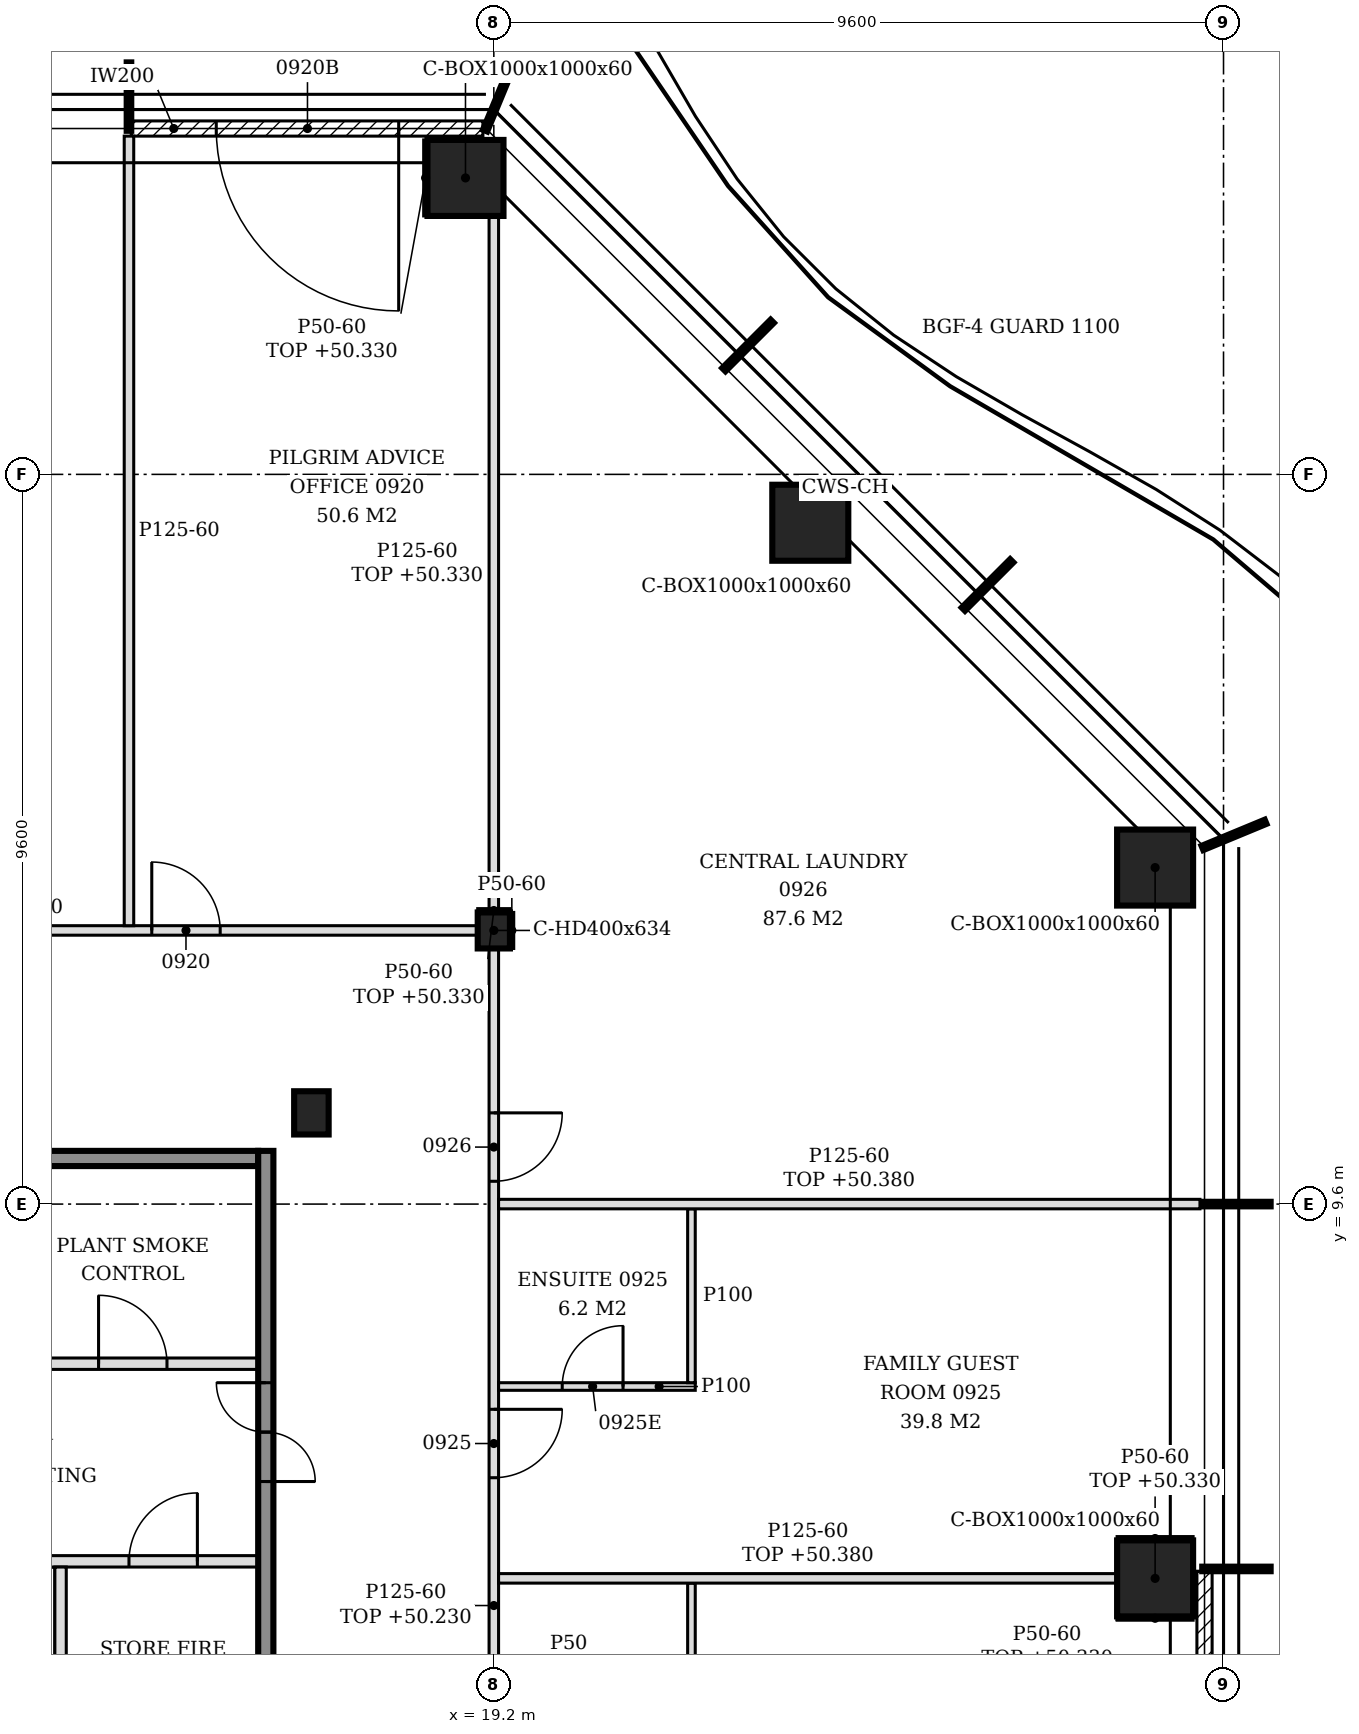
"""IFC4 building model, lengths in metres.
Left out: names, types, materials, properties, quantities, classifications, styles, units other than length and angle.
Written with IfcOpenShell. Run it as: python <this file> out.ifc"""

import sys

from ifc_helpers import new_model, si_unit, direction, frame, frame_2d, origin, origin_2d, place, context, subcontext, project, spatial, polyline, rectangle, hollow_rectangle, i_section, outline, extrude, element, fill, save


model = new_model("IFC4")
c1 = context("Model", 3, precision=1e-05, world=origin(), true_north=direction((0.0, 1.0)))
c2 = subcontext(c1, "Body", "Model", "MODEL_VIEW")
j1 = project(units=[si_unit("LENGTHUNIT", "METRE"), si_unit("PLANEANGLEUNIT", "RADIAN")], contexts=[c1])
p1 = place(None, origin())
s1 = spatial("IfcSite", under=j1, at=p1, CompositionType="ELEMENT")
p2 = place(p1, origin())
s2 = spatial("IfcBuilding", under=s1, at=p2, CompositionType="ELEMENT")
p3 = place(p2, frame((0.0, 0.0, 47.4)))
s3 = spatial("IfcBuildingStorey", under=s2, at=p3, CompositionType="ELEMENT", Elevation=47.4)
for number, where, z_axis, x_axis in (
    (1, (27.9, 4.676, -0.15), (0.0, 0.0, 1.0), (1.0, 0.0, 0.0)),
    (2, (27.9, 14.027, -0.15), (0.0, 0.0, 1.0), (1.0, 0.0, 0.0)),
    (3, (23.364, 18.564, -0.15), (0.0, 0.0, 1.0), (1.0, 0.0, 0.0)),
    (4, (18.827, 23.1, -0.15), (0.0, 0.0, 1.0), (1.0, 0.0, 0.0)),
):
    element("IfcColumn", number, at=place(p3, frame(where, z_axis=z_axis, x_axis=x_axis)), inside=s3, PredefinedType="COLUMN", context=c2, shape_type="SweptSolid", body=[
        extrude(hollow_rectangle(XDim=1.0, YDim=1.0, WallThickness=0.06, at=origin_2d()), origin(), (0.0, 0.0, 1.0), 3.6),
    ])
p4 = place(p3, frame((19.2, 13.2, -0.15), z_axis=(0.0, 0.0, 1.0), x_axis=(1.0, 0.0, 0.0)))
e5 = element("IfcColumn", 5, at=p4, inside=s3, PredefinedType="COLUMN", context=c2, shape_type="SweptSolid", body=[
    extrude(i_section(OverallWidth=0.424, OverallDepth=0.474, WebThickness=0.048, FlangeThickness=0.077, FilletRadius=0.015, at=origin_2d()), origin(), (0.0, 0.0, 1.0), 3.6),
])
p5 = place(p3, frame((16.8, 10.8, -0.15), z_axis=(0.0, 0.0, 1.0), x_axis=(1.0, 0.0, 0.0)))
e6 = element("IfcColumn", 6, at=p5, inside=s3, PredefinedType="COLUMN", context=c2, shape_type="SweptSolid", body=[
    extrude(i_section(OverallWidth=0.454, OverallDepth=0.569, WebThickness=0.078, FlangeThickness=0.125, FilletRadius=0.015, at=origin_2d()), origin(), (0.0, 0.0, 1.0), 3.6),
])
p6 = place(p3, frame((28.55, 0.03, 0.0), z_axis=(0.0, 0.0, 1.0), x_axis=(0.0, 1.0, 0.0)))
e7 = element("IfcWall", 7, at=p6, inside=s3, PredefinedType="NOTDEFINED", context=c2, shape_type="SweptSolid", body=[
    extrude(rectangle(XDim=4.74, YDim=0.2, at=frame_2d((2.37, 0.0))), origin(), (0.0, 0.0, 1.0), 3.45),
])
p7 = place(p6, frame((1.17, 0.0, 0.0)))
e8 = element("IfcOpeningElement", 8, at=p7, cuts=e7, PredefinedType="OPENING", context=c2, shape_type="SweptSolid", body=[
    extrude(rectangle(XDim=2.4, YDim=2.4, at=frame_2d((1.2, 1.2))), frame((0.0, 0.11, 0.0), z_axis=(0.0, -1.0, 0.0), x_axis=(1.0, 0.0, 0.0)), (0.0, 0.0, 1.0), 0.22),
])
p8 = place(p3, frame((19.056, 23.75, 0.0), z_axis=(0.0, 0.0, 1.0), x_axis=(-1.0, 0.0, 0.0)))
e9 = element("IfcWall", 9, at=p8, inside=s3, PredefinedType="NOTDEFINED", context=c2, shape_type="SweptSolid", body=[
    extrude(rectangle(XDim=4.626, YDim=0.2, at=frame_2d((2.313, 0.0))), origin(), (0.0, 0.0, 1.0), 3.45),
])
p9 = place(p8, frame((1.108, 0.0, 0.0)))
e10 = element("IfcOpeningElement", 10, at=p9, cuts=e9, PredefinedType="OPENING", context=c2, shape_type="SweptSolid", body=[
    extrude(rectangle(XDim=2.4, YDim=2.4, at=frame_2d((1.2, 1.2))), frame((0.0, 0.11, 0.0), z_axis=(0.0, -1.0, 0.0), x_axis=(1.0, 0.0, 0.0)), (0.0, 0.0, 1.0), 0.22),
])
p10 = place(p3, frame((9.7, 4.9, 0.0), z_axis=(0.0, 0.0, 1.0), x_axis=(1.0, 0.0, 0.0)))
e11 = element("IfcWall", 11, at=p10, inside=s3, PredefinedType="SOLIDWALL", context=c2, shape_type="SweptSolid", body=[
    extrude(rectangle(XDim=6.4, YDim=0.15, at=frame_2d((3.2, 0.0))), origin(), (0.0, 0.0, 1.0), 3.45),
])
p11 = place(p10, frame((0.45, 0.0, 0.0)))
e12 = element("IfcOpeningElement", 12, at=p11, cuts=e11, PredefinedType="OPENING", context=c2, shape_type="SweptSolid", body=[
    extrude(rectangle(XDim=1.0, YDim=2.1, at=frame_2d((0.5, 1.05))), frame((0.0, 0.085, 0.0), z_axis=(0.0, -1.0, 0.0), x_axis=(1.0, 0.0, 0.0)), (0.0, 0.0, 1.0), 0.17),
])
p12 = place(p10, frame((2.35, 0.0, 0.0)))
e13 = element("IfcOpeningElement", 13, at=p12, cuts=e11, PredefinedType="OPENING", context=c2, shape_type="SweptSolid", body=[
    extrude(rectangle(XDim=1.0, YDim=2.1, at=frame_2d((0.5, 1.05))), frame((0.0, 0.085, 0.0), z_axis=(0.0, -1.0, 0.0), x_axis=(1.0, 0.0, 0.0)), (0.0, 0.0, 1.0), 0.17),
])
p13 = place(p10, frame((4.7, 0.0, 0.0)))
e14 = element("IfcOpeningElement", 14, at=p13, cuts=e11, PredefinedType="OPENING", context=c2, shape_type="SweptSolid", body=[
    extrude(rectangle(XDim=0.9, YDim=2.1, at=frame_2d((0.45, 1.05))), frame((0.0, 0.085, 0.0), z_axis=(0.0, -1.0, 0.0), x_axis=(1.0, 0.0, 0.0)), (0.0, 0.0, 1.0), 0.17),
])
p14 = place(p3, frame((12.7, 7.5, 0.0), z_axis=(0.0, 0.0, 1.0), x_axis=(1.0, 0.0, 0.0)))
e15 = element("IfcWall", 15, at=p14, inside=s3, PredefinedType="SOLIDWALL", context=c2, shape_type="SweptSolid", body=[
    extrude(rectangle(XDim=3.4, YDim=0.15, at=frame_2d((1.7, 0.0))), origin(), (0.0, 0.0, 1.0), 3.45),
])
p15 = place(p14, frame((1.3, 0.0, 0.0)))
e16 = element("IfcOpeningElement", 16, at=p15, cuts=e15, PredefinedType="OPENING", context=c2, shape_type="SweptSolid", body=[
    extrude(rectangle(XDim=0.9, YDim=2.1, at=frame_2d((0.45, 1.05))), frame((0.0, 0.085, 0.0), z_axis=(0.0, -1.0, 0.0), x_axis=(1.0, 0.0, 0.0)), (0.0, 0.0, 1.0), 0.17),
])
p16 = place(p3, frame((12.7, 10.2, 0.0), z_axis=(0.0, 0.0, 1.0), x_axis=(1.0, 0.0, 0.0)))
e17 = element("IfcWall", 17, at=p16, inside=s3, PredefinedType="SOLIDWALL", context=c2, shape_type="SweptSolid", body=[
    extrude(rectangle(XDim=3.4, YDim=0.2, at=frame_2d((1.7, 0.0))), origin(), (0.0, 0.0, 1.0), 3.45),
])
p17 = place(p3, frame((13.5, 2.275, 0.0), z_axis=(0.0, 0.0, 1.0), x_axis=(0.0, 1.0, 0.0)))
e18 = element("IfcWall", 18, at=p17, inside=s3, PredefinedType="SOLIDWALL", context=c2, shape_type="SweptSolid", body=[
    extrude(rectangle(XDim=2.55, YDim=0.15, at=frame_2d((1.275, 0.0))), origin(), (0.0, 0.0, 1.0), 3.45),
])
p18 = place(p3, frame((16.2, -5.5, 0.0), z_axis=(0.0, 0.0, 1.0), x_axis=(0.0, 1.0, 0.0)))
e19 = element("IfcWall", 19, at=p18, inside=s3, PredefinedType="SOLIDWALL", context=c2, shape_type="SweptSolid", body=[
    extrude(rectangle(XDim=15.8, YDim=0.2, at=frame_2d((7.9, 0.0))), origin(), (0.0, 0.0, 1.0), 3.45),
])
p19 = place(p18, frame((3.05, 0.0, 0.0)))
e20 = element("IfcOpeningElement", 20, at=p19, cuts=e19, PredefinedType="OPENING", context=c2, shape_type="SweptSolid", body=[
    extrude(rectangle(XDim=1.3, YDim=2.1, at=frame_2d((0.65, 1.05))), frame((0.0, 0.11, 0.0), z_axis=(0.0, -1.0, 0.0), x_axis=(1.0, 0.0, 0.0)), (0.0, 0.0, 1.0), 0.22),
])
p20 = place(p18, frame((11.45, 0.0, 0.0)))
e21 = element("IfcOpeningElement", 21, at=p20, cuts=e19, PredefinedType="OPENING", context=c2, shape_type="SweptSolid", body=[
    extrude(rectangle(XDim=1.3, YDim=2.1, at=frame_2d((0.65, 1.05))), frame((0.0, 0.11, 0.0), z_axis=(0.0, -1.0, 0.0), x_axis=(1.0, 0.0, 0.0)), (0.0, 0.0, 1.0), 0.22),
])
p21 = place(p3, frame((21.8, 2.326, 0.0), z_axis=(0.0, 0.0, 1.0), x_axis=(0.0, 1.0, 0.0)))
e22 = element("IfcWall", 22, at=p21, inside=s3, PredefinedType="PARTITIONING", context=c2, shape_type="SweptSolid", body=[
    extrude(rectangle(XDim=2.288, YDim=0.1, at=frame_2d((1.144, 0.0))), origin(), (0.0, 0.0, 1.0), 3.45),
])
p22 = place(p3, frame((19.2, 2.637, 0.0), z_axis=(0.0, 0.0, 1.0), x_axis=(0.0, 1.0, 0.0)))
e23 = element("IfcWall", 23, at=p22, inside=s3, PredefinedType="PARTITIONING", context=c2, shape_type="SweptSolid", body=[
    extrude(rectangle(XDim=10.326, YDim=0.125, at=frame_2d((5.163, 0.0))), origin(), (0.0, 0.0, 1.0), 2.83),
])
p23 = place(p22, frame((3.363, 0.0, 0.0)))
e24 = element("IfcOpeningElement", 24, at=p23, cuts=e23, PredefinedType="OPENING", context=c2, shape_type="SweptSolid", body=[
    extrude(rectangle(XDim=0.9, YDim=2.1, at=frame_2d((0.45, 1.05))), frame((0.0, 0.073, 0.0), z_axis=(0.0, -1.0, 0.0), x_axis=(1.0, 0.0, 0.0)), (0.0, 0.0, 1.0), 0.145),
])
p24 = place(p22, frame((7.263, 0.0, 0.0)))
e25 = element("IfcOpeningElement", 25, at=p24, cuts=e23, PredefinedType="OPENING", context=c2, shape_type="SweptSolid", body=[
    extrude(rectangle(XDim=0.9, YDim=2.1, at=frame_2d((0.45, 1.05))), frame((0.0, 0.073, 0.0), z_axis=(0.0, -1.0, 0.0), x_axis=(1.0, 0.0, 0.0)), (0.0, 0.0, 1.0), 0.145),
])
p25 = place(p3, frame((19.262, 4.676, 0.0), z_axis=(0.0, 0.0, 1.0), x_axis=(1.0, 0.0, 0.0)))
e26 = element("IfcWall", 26, at=p25, inside=s3, PredefinedType="PARTITIONING", context=c2, shape_type="SweptSolid", body=[
    extrude(outline(polyline([(0.0, 0.0), (8.137, 0.0), (8.137, 2.98), (0.087, 2.98), (0.085, 2.83), (0.0, 2.83), (0.0, 0.0)])), frame((0.0, 0.062, 0.0), z_axis=(0.0, -1.0, 0.0), x_axis=(1.0, 0.0, 0.0)), (0.0, 0.0, 1.0), 0.125),
])
p26 = place(p3, frame((19.262, 7.2, 0.0), z_axis=(0.0, 0.0, 1.0), x_axis=(1.0, 0.0, 0.0)))
e27 = element("IfcWall", 27, at=p26, inside=s3, PredefinedType="PARTITIONING", context=c2, shape_type="SweptSolid", body=[
    extrude(outline(polyline([(0.0, 0.0), (2.588, 0.0), (2.587, 3.45), (0.087, 3.45), (0.085, 2.83), (0.0, 2.83), (0.0, 0.0)])), frame((0.0, 0.05, 0.0), z_axis=(0.0, -1.0, 0.0), x_axis=(1.0, 0.0, 0.0)), (0.0, 0.0, 1.0), 0.1),
])
p27 = place(p26, frame((0.837, 0.0, 0.0)))
e28 = element("IfcOpeningElement", 28, at=p27, cuts=e27, PredefinedType="OPENING", context=c2, shape_type="SweptSolid", body=[
    extrude(rectangle(XDim=0.8, YDim=2.1, at=frame_2d((0.4, 1.05))), frame((0.0, 0.06, 0.0), z_axis=(0.0, -1.0, 0.0), x_axis=(1.0, 0.0, 0.0)), (0.0, 0.0, 1.0), 0.12),
])
p28 = place(p3, frame((21.8, 7.25, 0.0), z_axis=(0.0, 0.0, 1.0), x_axis=(0.0, 1.0, 0.0)))
e29 = element("IfcWall", 29, at=p28, inside=s3, PredefinedType="PARTITIONING", context=c2, shape_type="SweptSolid", body=[
    extrude(outline(polyline([(0.0, 0.0), (2.288, 0.0), (2.288, 2.98), (2.255, 2.98), (2.253, 3.45), (0.0, 3.45), (0.0, 0.0)])), frame((0.0, 0.05, 0.0), z_axis=(0.0, -1.0, 0.0), x_axis=(1.0, 0.0, 0.0)), (0.0, 0.0, 1.0), 0.1),
])
p29 = place(p3, frame((19.262, 9.6, 0.0), z_axis=(0.0, 0.0, 1.0), x_axis=(1.0, 0.0, 0.0)))
e30 = element("IfcWall", 30, at=p29, inside=s3, PredefinedType="PARTITIONING", context=c2, shape_type="SweptSolid", body=[
    extrude(outline(polyline([(0.0, 0.0), (9.228, 0.0), (9.228, 2.98), (8.788, 2.98), (8.785, 2.93), (8.488, 2.93), (8.486, 2.98), (0.087, 2.98), (0.085, 2.83), (0.0, 2.83), (0.0, 0.0)])), frame((0.0, 0.062, 0.0), z_axis=(0.0, -1.0, 0.0), x_axis=(1.0, 0.0, 0.0)), (0.0, 0.0, 1.0), 0.125),
])
p30 = place(p3, frame((7.412, 13.2, 0.0), z_axis=(0.0, 0.0, 1.0), x_axis=(1.0, 0.0, 0.0)))
e31 = element("IfcWall", 31, at=p30, inside=s3, PredefinedType="PARTITIONING", context=c2, shape_type="SweptSolid", body=[
    extrude(rectangle(XDim=11.576, YDim=0.125, at=frame_2d((5.788, 0.0))), origin(), (0.0, 0.0, 1.0), 2.83),
])
p31 = place(p30, frame((0.788, 0.0, 0.0)))
e32 = element("IfcOpeningElement", 32, at=p31, cuts=e31, PredefinedType="OPENING", context=c2, shape_type="SweptSolid", body=[
    extrude(rectangle(XDim=0.9, YDim=2.1, at=frame_2d((0.45, 1.05))), frame((0.0, 0.073, 0.0), z_axis=(0.0, -1.0, 0.0), x_axis=(1.0, 0.0, 0.0)), (0.0, 0.0, 1.0), 0.145),
])
p32 = place(p30, frame((2.302, 0.0, 0.0)))
e33 = element("IfcOpeningElement", 33, at=p32, cuts=e31, PredefinedType="OPENING", context=c2, shape_type="SweptSolid", body=[
    extrude(rectangle(XDim=0.9, YDim=2.1, at=frame_2d((0.45, 1.05))), frame((0.0, 0.073, 0.0), z_axis=(0.0, -1.0, 0.0), x_axis=(1.0, 0.0, 0.0)), (0.0, 0.0, 1.0), 0.145),
])
p33 = place(p30, frame((7.288, 0.0, 0.0)))
e34 = element("IfcOpeningElement", 34, at=p33, cuts=e31, PredefinedType="OPENING", context=c2, shape_type="SweptSolid", body=[
    extrude(rectangle(XDim=0.9, YDim=2.1, at=frame_2d((0.45, 1.05))), frame((0.0, 0.073, 0.0), z_axis=(0.0, -1.0, 0.0), x_axis=(1.0, 0.0, 0.0)), (0.0, 0.0, 1.0), 0.145),
])
p34 = place(p3, frame((14.4, 13.262, 0.0), z_axis=(0.0, 0.0, 1.0), x_axis=(0.0, 1.0, 0.0)))
e35 = element("IfcWall", 35, at=p34, inside=s3, PredefinedType="PARTITIONING", context=c2, shape_type="SweptSolid", body=[
    extrude(outline(polyline([(0.0, 0.0), (10.387, 0.0), (10.387, 3.45), (9.988, 3.45), (9.986, 2.93), (9.688, 2.93), (9.686, 3.45), (6.042, 3.45), (6.041, 2.88), (5.833, 2.88), (5.831, 3.45), (0.087, 3.45), (0.085, 2.83), (0.0, 2.83), (0.0, 0.0)])), frame((0.0, 0.062, 0.0), z_axis=(0.0, -1.0, 0.0), x_axis=(1.0, 0.0, 0.0)), (0.0, 0.0, 1.0), 0.125),
])
p35 = place(p3, frame((19.2, 13.437, 0.0), z_axis=(0.0, 0.0, 1.0), x_axis=(0.0, 1.0, 0.0)))
e36 = element("IfcWall", 36, at=p35, inside=s3, PredefinedType="PARTITIONING", context=c2, shape_type="SweptSolid", body=[
    extrude(outline(polyline([(0.0, 0.0), (9.163, 0.0), (9.163, 2.63), (8.733, 2.63), (8.731, 2.93), (0.0, 2.93), (0.0, 0.0)])), frame((0.0, 0.062, 0.0), z_axis=(0.0, -1.0, 0.0), x_axis=(1.0, 0.0, 0.0)), (0.0, 0.0, 1.0), 0.125),
])
p36 = place(p3, frame((19.437, 12.963, 0.0), z_axis=(0.0, 0.0, 1.0), x_axis=(0.0, 1.0, 0.0)))
e37 = element("IfcWall", 37, at=p36, inside=s3, PredefinedType="PARTITIONING", context=c2, shape_type="SweptSolid", body=[
    extrude(rectangle(XDim=0.474, YDim=0.05, at=frame_2d((0.237, 0.0))), origin(), (0.0, 0.0, 1.0), 3.45),
])
for number, where, z_axis, x_axis in (
    (38, (27.4, 5.201, 0.0), (0.0, 0.0, 1.0), (1.0, 0.0, 0.0)),
    (39, (27.4, 4.151, 0.0), (0.0, 0.0, 1.0), (1.0, 0.0, 0.0)),
):
    element("IfcWall", number, at=place(p3, frame(where, z_axis=z_axis, x_axis=x_axis)), inside=s3, PredefinedType="PARTITIONING", context=c2, shape_type="SweptSolid", body=[
        extrude(rectangle(XDim=1.0, YDim=0.05, at=frame_2d((0.5, 0.0))), origin(), (0.0, 0.0, 1.0), 2.93),
    ])
p37 = place(p3, frame((18.988, 13.462, 0.0), z_axis=(0.0, 0.0, 1.0), x_axis=(1.0, 0.0, 0.0)))
e40 = element("IfcWall", 40, at=p37, inside=s3, PredefinedType="PARTITIONING", context=c2, shape_type="SweptSolid", body=[
    extrude(rectangle(XDim=0.424, YDim=0.05, at=frame_2d((0.212, 0.0))), origin(), (0.0, 0.0, 1.0), 2.93),
])
p38 = place(p3, frame((18.302, 22.6, 0.0), z_axis=(0.0, 0.0, 1.0), x_axis=(0.0, 1.0, 0.0)))
e41 = element("IfcWall", 41, at=p38, inside=s3, PredefinedType="PARTITIONING", context=c2, shape_type="SweptSolid", body=[
    extrude(rectangle(XDim=1.0, YDim=0.05, at=frame_2d((0.5, 0.0))), origin(), (0.0, 0.0, 1.0), 2.93),
])
p39 = place(p9, origin())
e42 = element("IfcDoor", 42, at=p39, inside=s3, OperationType="SINGLE_SWING_LEFT", PredefinedType="DOOR", context=c2, shape_type="SweptSolid", body=[
    extrude(rectangle(XDim=2.4, YDim=2.4, at=frame_2d((1.2, 1.2))), frame((0.0, 0.025, 0.0), z_axis=(0.0, -1.0, 0.0), x_axis=(1.0, 0.0, 0.0)), (0.0, 0.0, 1.0), 0.05),
])
fill(e10, e42)
p40 = place(p20, origin())
e43 = element("IfcDoor", 43, at=p40, inside=s3, OperationType="DOUBLE_DOOR_SINGLE_SWING", PredefinedType="DOOR", context=c2, shape_type="SweptSolid", body=[
    extrude(rectangle(XDim=1.3, YDim=2.1, at=frame_2d((0.65, 1.05))), frame((0.0, 0.025, 0.0), z_axis=(0.0, -1.0, 0.0), x_axis=(1.0, 0.0, 0.0)), (0.0, 0.0, 1.0), 0.05),
])
fill(e21, e43)
p41 = place(p13, origin())
e44 = element("IfcDoor", 44, at=p41, inside=s3, OperationType="SINGLE_SWING_RIGHT", PredefinedType="DOOR", context=c2, shape_type="SweptSolid", body=[
    extrude(rectangle(XDim=0.9, YDim=2.1, at=frame_2d((0.45, 1.05))), frame((0.0, 0.025, 0.0), z_axis=(0.0, -1.0, 0.0), x_axis=(1.0, 0.0, 0.0)), (0.0, 0.0, 1.0), 0.05),
])
fill(e14, e44)
p42 = place(p15, origin())
e45 = element("IfcDoor", 45, at=p42, inside=s3, OperationType="SINGLE_SWING_LEFT", PredefinedType="DOOR", context=c2, shape_type="SweptSolid", body=[
    extrude(rectangle(XDim=0.9, YDim=2.1, at=frame_2d((0.45, 1.05))), frame((0.0, 0.025, 0.0), z_axis=(0.0, -1.0, 0.0), x_axis=(1.0, 0.0, 0.0)), (0.0, 0.0, 1.0), 0.05),
])
fill(e16, e45)
p43 = place(p33, origin())
e46 = element("IfcDoor", 46, at=p43, inside=s3, OperationType="SINGLE_SWING_LEFT", PredefinedType="DOOR", context=c2, shape_type="SweptSolid", body=[
    extrude(rectangle(XDim=0.9, YDim=2.1, at=frame_2d((0.45, 1.05))), frame((0.0, 0.025, 0.0), z_axis=(0.0, -1.0, 0.0), x_axis=(1.0, 0.0, 0.0)), (0.0, 0.0, 1.0), 0.05),
])
fill(e34, e46)
p44 = place(p23, frame((0.9, 0.0, 0.0), z_axis=(0.0, 0.0, 1.0), x_axis=(-1.0, 0.0, 0.0)))
e47 = element("IfcDoor", 47, at=p44, inside=s3, OperationType="SINGLE_SWING_LEFT", PredefinedType="DOOR", context=c2, shape_type="SweptSolid", body=[
    extrude(rectangle(XDim=0.9, YDim=2.1, at=frame_2d((0.45, 1.05))), frame((0.0, 0.025, 0.0), z_axis=(0.0, -1.0, 0.0), x_axis=(1.0, 0.0, 0.0)), (0.0, 0.0, 1.0), 0.05),
])
fill(e24, e47)
p45 = place(p27, origin())
e48 = element("IfcDoor", 48, at=p45, inside=s3, OperationType="SINGLE_SWING_RIGHT", PredefinedType="DOOR", context=c2, shape_type="SweptSolid", body=[
    extrude(rectangle(XDim=0.8, YDim=2.1, at=frame_2d((0.4, 1.05))), frame((0.0, 0.025, 0.0), z_axis=(0.0, -1.0, 0.0), x_axis=(1.0, 0.0, 0.0)), (0.0, 0.0, 1.0), 0.05),
])
fill(e28, e48)
p46 = place(p24, frame((0.9, 0.0, 0.0), z_axis=(0.0, 0.0, 1.0), x_axis=(-1.0, 0.0, 0.0)))
e49 = element("IfcDoor", 49, at=p46, inside=s3, OperationType="SINGLE_SWING_LEFT", PredefinedType="DOOR", context=c2, shape_type="SweptSolid", body=[
    extrude(rectangle(XDim=0.9, YDim=2.1, at=frame_2d((0.45, 1.05))), frame((0.0, 0.025, 0.0), z_axis=(0.0, -1.0, 0.0), x_axis=(1.0, 0.0, 0.0)), (0.0, 0.0, 1.0), 0.05),
])
fill(e25, e49)
save(model, sys.argv[1])
